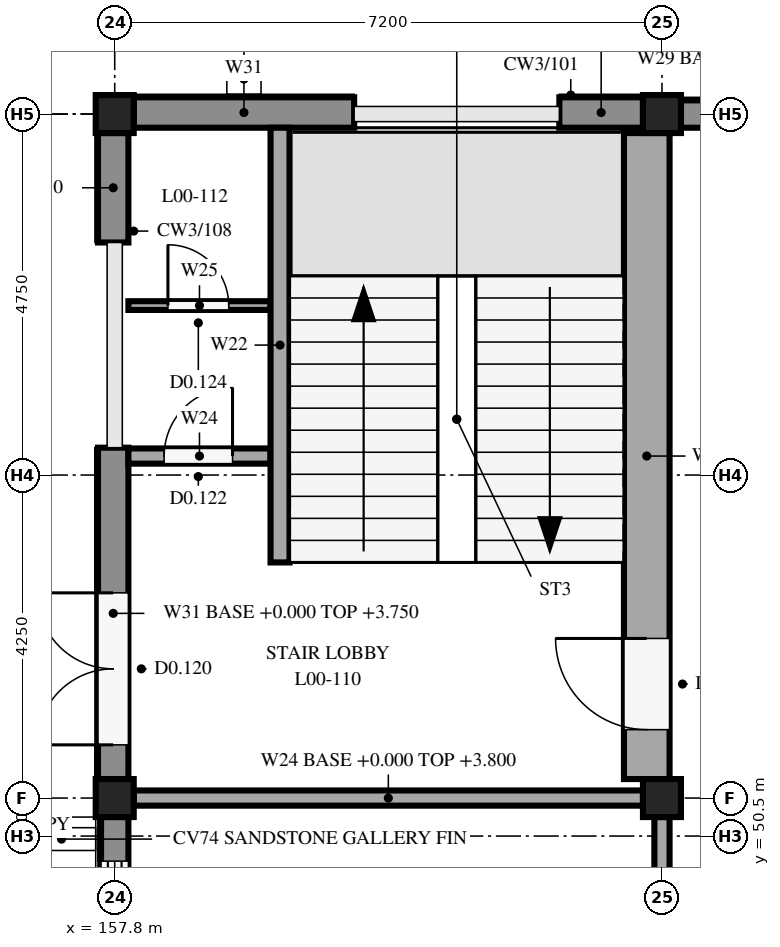
"""IFC4 building model, lengths in metres.
Left out: names, types, materials, properties, quantities, classifications, styles, units other than length and angle.
Written with IfcOpenShell. Run it as: python <this file> out.ifc"""

import sys

from ifc_helpers import new_model, si_unit, direction, frame, frame_2d, origin, origin_2d, place, context, subcontext, project, spatial, rectangle, extrude, element, fill, save


model = new_model("IFC4")
c1 = context("Model", 3, precision=1e-05, world=origin(), true_north=direction((0.0, 1.0)))
c2 = subcontext(c1, "Body", "Model", "MODEL_VIEW")
j1 = project(units=[si_unit("LENGTHUNIT", "METRE"), si_unit("PLANEANGLEUNIT", "RADIAN")], contexts=[c1])
p1 = place(None, origin())
s1 = spatial("IfcSite", under=j1, at=p1, CompositionType="ELEMENT")
p2 = place(p1, origin())
s2 = spatial("IfcBuilding", under=s1, at=p2, CompositionType="ELEMENT")
p3 = place(p2, origin())
s3 = spatial("IfcBuildingStorey", under=s2, at=p3, CompositionType="ELEMENT", Elevation=0.0)
for number, where, z_axis, x_axis in (
    (1, (157.8, 51.0, 0.0), (0.0, 0.0, 1.0), (1.0, 0.0, 0.0)),
    (2, (157.8, 60.0, 0.0), (0.0, 0.0, 1.0), (1.0, 0.0, 0.0)),
    (3, (165.0, 51.0, 0.0), (0.0, 0.0, 1.0), (1.0, 0.0, 0.0)),
    (4, (165.0, 60.0, 0.0), (0.0, 0.0, 1.0), (1.0, 0.0, 0.0)),
):
    element("IfcColumn", number, at=place(p3, frame(where, z_axis=z_axis, x_axis=x_axis)), inside=s3, PredefinedType="COLUMN", context=c2, shape_type="SweptSolid", body=[
        extrude(rectangle(XDim=0.5, YDim=0.5, at=origin_2d()), origin(), (0.0, 0.0, 1.0), 4.25),
    ])
p4 = place(p3, frame((157.8, 42.25, 0.0), z_axis=(0.0, 0.0, 1.0), x_axis=(0.0, 1.0, 0.0)))
e5 = element("IfcWall", 5, at=p4, inside=s3, PredefinedType="STANDARD", context=c2, shape_type="SweptSolid", body=[
    extrude(rectangle(XDim=8.5, YDim=0.36, at=frame_2d((4.25, 0.0))), origin(), (0.0, 0.0, 1.0), 3.75),
])
p5 = place(p4, frame((0.58, 0.0, 0.6)))
e6 = element("IfcOpeningElement", 6, at=p5, cuts=e5, PredefinedType="OPENING", context=c2, shape_type="SweptSolid", body=[
    extrude(rectangle(XDim=1.4, YDim=3.0, at=frame_2d((0.7, 1.5))), frame((0.0, 0.19, 0.0), z_axis=(0.0, -1.0, 0.0), x_axis=(1.0, 0.0, 0.0)), (0.0, 0.0, 1.0), 0.38),
])
p6 = place(p4, frame((2.56, 0.0, 0.6)))
e7 = element("IfcOpeningElement", 7, at=p6, cuts=e5, PredefinedType="OPENING", context=c2, shape_type="SweptSolid", body=[
    extrude(rectangle(XDim=1.4, YDim=3.0, at=frame_2d((0.7, 1.5))), frame((0.0, 0.19, 0.0), z_axis=(0.0, -1.0, 0.0), x_axis=(1.0, 0.0, 0.0)), (0.0, 0.0, 1.0), 0.38),
])
p7 = place(p4, frame((4.54, 0.0, 0.6)))
e8 = element("IfcOpeningElement", 8, at=p7, cuts=e5, PredefinedType="OPENING", context=c2, shape_type="SweptSolid", body=[
    extrude(rectangle(XDim=1.4, YDim=3.0, at=frame_2d((0.7, 1.5))), frame((0.0, 0.19, 0.0), z_axis=(0.0, -1.0, 0.0), x_axis=(1.0, 0.0, 0.0)), (0.0, 0.0, 1.0), 0.38),
])
p8 = place(p4, frame((6.52, 0.0, 0.6)))
e9 = element("IfcOpeningElement", 9, at=p8, cuts=e5, PredefinedType="OPENING", context=c2, shape_type="SweptSolid", body=[
    extrude(rectangle(XDim=1.4, YDim=3.0, at=frame_2d((0.7, 1.5))), frame((0.0, 0.19, 0.0), z_axis=(0.0, -1.0, 0.0), x_axis=(1.0, 0.0, 0.0)), (0.0, 0.0, 1.0), 0.38),
])
p9 = place(p3, frame((157.78, 51.25, 0.0), z_axis=(0.0, 0.0, 1.0), x_axis=(0.0, 1.0, 0.0)))
e10 = element("IfcWall", 10, at=p9, inside=s3, PredefinedType="STANDARD", context=c2, shape_type="SweptSolid", body=[
    extrude(rectangle(XDim=4.36, YDim=0.4, at=frame_2d((2.18, 0.0))), origin(), (0.0, 0.0, 1.0), 3.75),
])
p10 = place(p9, frame((0.45, 0.0, 0.0)))
e11 = element("IfcOpeningElement", 11, at=p10, cuts=e10, PredefinedType="OPENING", context=c2, shape_type="SweptSolid", body=[
    extrude(rectangle(XDim=2.0, YDim=2.2, at=frame_2d((1.0, 1.1))), frame((0.0, 0.21, 0.0), z_axis=(0.0, -1.0, 0.0), x_axis=(1.0, 0.0, 0.0)), (0.0, 0.0, 1.0), 0.42),
])
p11 = place(p3, frame((157.78, 58.31, 0.0), z_axis=(0.0, 0.0, 1.0), x_axis=(0.0, 1.0, 0.0)))
e12 = element("IfcWall", 12, at=p11, inside=s3, PredefinedType="STANDARD", context=c2, shape_type="SweptSolid", body=[
    extrude(rectangle(XDim=1.44, YDim=0.4, at=frame_2d((0.72, 0.0))), origin(), (0.0, 0.0, 1.0), 3.75),
])
p12 = place(p3, frame((158.05, 60.02, 0.0), z_axis=(0.0, 0.0, 1.0), x_axis=(1.0, 0.0, 0.0)))
e13 = element("IfcWall", 13, at=p12, inside=s3, PredefinedType="STANDARD", context=c2, shape_type="SweptSolid", body=[
    extrude(rectangle(XDim=2.9, YDim=0.4, at=frame_2d((1.45, 0.0))), origin(), (0.0, 0.0, 1.0), 3.8),
])
p13 = place(p3, frame((163.65, 60.02, 0.0), z_axis=(0.0, 0.0, 1.0), x_axis=(1.0, 0.0, 0.0)))
e14 = element("IfcWall", 14, at=p13, inside=s3, PredefinedType="STANDARD", context=c2, shape_type="SweptSolid", body=[
    extrude(rectangle(XDim=1.1, YDim=0.4, at=frame_2d((0.55, 0.0))), origin(), (0.0, 0.0, 1.0), 3.8),
])
p14 = place(p3, frame((165.25, 60.0, 0.0), z_axis=(0.0, 0.0, 1.0), x_axis=(1.0, 0.0, 0.0)))
e15 = element("IfcWall", 15, at=p14, inside=s3, PredefinedType="STANDARD", context=c2, shape_type="SweptSolid", body=[
    extrude(rectangle(XDim=2.2, YDim=0.36, at=frame_2d((1.1, 0.0))), origin(), (0.0, 0.0, 1.0), 3.9),
])
p15 = place(p14, frame((0.3, 0.0, 0.0)))
e16 = element("IfcOpeningElement", 16, at=p15, cuts=e15, PredefinedType="OPENING", context=c2, shape_type="SweptSolid", body=[
    extrude(rectangle(XDim=1.6, YDim=2.1, at=frame_2d((0.8, 1.05))), frame((0.0, 0.19, 0.0), z_axis=(0.0, -1.0, 0.0), x_axis=(1.0, 0.0, 0.0)), (0.0, 0.0, 1.0), 0.38),
])
p16 = place(p3, frame((159.975, 54.1, 0.0), z_axis=(0.0, 0.0, 1.0), x_axis=(0.0, 1.0, 0.0)))
e17 = element("IfcWall", 17, at=p16, inside=s3, PredefinedType="SOLIDWALL", context=c2, shape_type="SweptSolid", body=[
    extrude(rectangle(XDim=5.72, YDim=0.25, at=frame_2d((2.86, 0.0))), origin(), (0.0, 0.0, 1.0), 4.25),
])
p17 = place(p3, frame((164.8, 51.25, 0.0), z_axis=(0.0, 0.0, 1.0), x_axis=(0.0, 1.0, 0.0)))
e18 = element("IfcWall", 18, at=p17, inside=s3, PredefinedType="SOLIDWALL", context=c2, shape_type="SweptSolid", body=[
    extrude(rectangle(XDim=8.5, YDim=0.6, at=frame_2d((4.25, 0.0))), origin(), (0.0, 0.0, 1.0), 4.25),
])
p18 = place(p17, frame((0.65, 0.0, 0.0)))
e19 = element("IfcOpeningElement", 19, at=p18, cuts=e18, PredefinedType="OPENING", context=c2, shape_type="SweptSolid", body=[
    extrude(rectangle(XDim=1.2, YDim=2.1, at=frame_2d((0.6, 1.05))), frame((0.0, 0.31, 0.0), z_axis=(0.0, -1.0, 0.0), x_axis=(1.0, 0.0, 0.0)), (0.0, 0.0, 1.0), 0.62),
])
p19 = place(p3, frame((157.98, 55.5, 0.0), z_axis=(0.0, 0.0, 1.0), x_axis=(1.0, 0.0, 0.0)))
e20 = element("IfcWall", 20, at=p19, inside=s3, PredefinedType="SOLIDWALL", context=c2, shape_type="SweptSolid", body=[
    extrude(rectangle(XDim=1.87, YDim=0.2, at=frame_2d((0.935, 0.0))), origin(), (0.0, 0.0, 1.0), 4.25),
])
p20 = place(p19, frame((0.47, 0.0, 0.0)))
e21 = element("IfcOpeningElement", 21, at=p20, cuts=e20, PredefinedType="OPENING", context=c2, shape_type="SweptSolid", body=[
    extrude(rectangle(XDim=0.9, YDim=2.1, at=frame_2d((0.45, 1.05))), frame((0.0, 0.11, 0.0), z_axis=(0.0, -1.0, 0.0), x_axis=(1.0, 0.0, 0.0)), (0.0, 0.0, 1.0), 0.22),
])
p21 = place(p3, frame((157.98, 57.48, 0.0), z_axis=(0.0, 0.0, 1.0), x_axis=(1.0, 0.0, 0.0)))
e22 = element("IfcWall", 22, at=p21, inside=s3, PredefinedType="PARTITIONING", context=c2, shape_type="SweptSolid", body=[
    extrude(rectangle(XDim=1.87, YDim=0.115, at=frame_2d((0.935, 0.0))), origin(), (0.0, 0.0, 1.0), 4.25),
])
p22 = place(p21, frame((0.52, 0.0, 0.0)))
e23 = element("IfcOpeningElement", 23, at=p22, cuts=e22, PredefinedType="OPENING", context=c2, shape_type="SweptSolid", body=[
    extrude(rectangle(XDim=0.8, YDim=2.1, at=frame_2d((0.4, 1.05))), frame((0.0, 0.067, 0.0), z_axis=(0.0, -1.0, 0.0), x_axis=(1.0, 0.0, 0.0)), (0.0, 0.0, 1.0), 0.135),
])
p23 = place(p3, frame((158.05, 51.0, 0.0), z_axis=(0.0, 0.0, 1.0), x_axis=(1.0, 0.0, 0.0)))
e24 = element("IfcWall", 24, at=p23, inside=s3, PredefinedType="SOLIDWALL", context=c2, shape_type="SweptSolid", body=[
    extrude(rectangle(XDim=6.7, YDim=0.2, at=frame_2d((3.35, 0.0))), origin(), (0.0, 0.0, 1.0), 3.8),
])
p24 = place(p3, frame((165.0, 42.25, 0.0), z_axis=(0.0, 0.0, 1.0), x_axis=(0.0, 1.0, 0.0)))
e25 = element("IfcWall", 25, at=p24, inside=s3, PredefinedType="PARTITIONING", context=c2, shape_type="SweptSolid", body=[
    extrude(rectangle(XDim=8.5, YDim=0.2, at=frame_2d((4.25, 0.0))), origin(), (0.0, 0.0, 1.0), 3.8),
])
p25 = place(p24, frame((3.75, 0.0, 0.0)))
e26 = element("IfcOpeningElement", 26, at=p25, cuts=e25, PredefinedType="OPENING", context=c2, shape_type="SweptSolid", body=[
    extrude(rectangle(XDim=1.0, YDim=2.1, at=frame_2d((0.5, 1.05))), frame((0.0, 0.11, 0.0), z_axis=(0.0, -1.0, 0.0), x_axis=(1.0, 0.0, 0.0)), (0.0, 0.0, 1.0), 0.22),
])
p26 = place(p8, origin())
e27 = element("IfcWindow", 27, at=p26, inside=s3, PartitioningType="DOUBLE_PANEL_VERTICAL", PredefinedType="WINDOW", context=c2, shape_type="SweptSolid", body=[
    extrude(rectangle(XDim=1.4, YDim=3.0, at=frame_2d((0.7, 1.5))), frame((0.0, 0.03, 0.0), z_axis=(0.0, -1.0, 0.0), x_axis=(1.0, 0.0, 0.0)), (0.0, 0.0, 1.0), 0.06),
])
fill(e9, e27)
p27 = place(p10, origin())
e28 = element("IfcDoor", 28, at=p27, inside=s3, OperationType="DOUBLE_DOOR_SINGLE_SWING", PredefinedType="DOOR", context=c2, shape_type="SweptSolid", body=[
    extrude(rectangle(XDim=2.0, YDim=2.2, at=frame_2d((1.0, 1.1))), frame((0.0, 0.025, 0.0), z_axis=(0.0, -1.0, 0.0), x_axis=(1.0, 0.0, 0.0)), (0.0, 0.0, 1.0), 0.05),
])
fill(e11, e28)
p28 = place(p18, origin())
e29 = element("IfcDoor", 29, at=p28, inside=s3, OperationType="SINGLE_SWING_RIGHT", PredefinedType="DOOR", context=c2, shape_type="SweptSolid", body=[
    extrude(rectangle(XDim=1.2, YDim=2.1, at=frame_2d((0.6, 1.05))), frame((0.0, 0.025, 0.0), z_axis=(0.0, -1.0, 0.0), x_axis=(1.0, 0.0, 0.0)), (0.0, 0.0, 1.0), 0.05),
])
fill(e19, e29)
p29 = place(p20, origin())
e30 = element("IfcDoor", 30, at=p29, inside=s3, OperationType="SINGLE_SWING_RIGHT", PredefinedType="DOOR", context=c2, shape_type="SweptSolid", body=[
    extrude(rectangle(XDim=0.9, YDim=2.1, at=frame_2d((0.45, 1.05))), frame((0.0, 0.025, 0.0), z_axis=(0.0, -1.0, 0.0), x_axis=(1.0, 0.0, 0.0)), (0.0, 0.0, 1.0), 0.05),
])
fill(e21, e30)
p30 = place(p22, origin())
e31 = element("IfcDoor", 31, at=p30, inside=s3, OperationType="SINGLE_SWING_LEFT", PredefinedType="DOOR", context=c2, shape_type="SweptSolid", body=[
    extrude(rectangle(XDim=0.8, YDim=2.1, at=frame_2d((0.4, 1.05))), frame((0.0, 0.025, 0.0), z_axis=(0.0, -1.0, 0.0), x_axis=(1.0, 0.0, 0.0)), (0.0, 0.0, 1.0), 0.05),
])
fill(e23, e31)
save(model, sys.argv[1])
